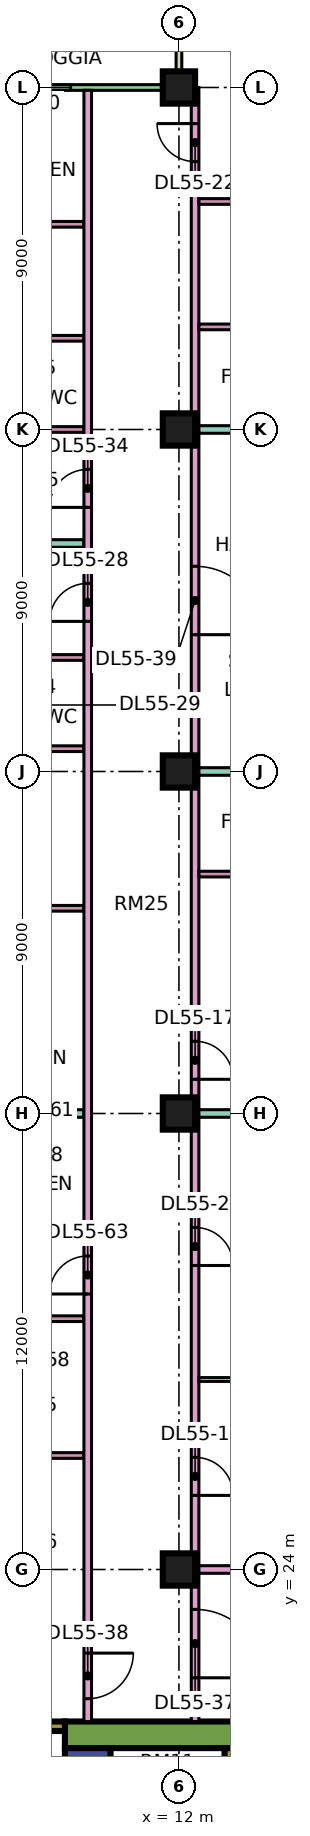
"""IFC4 building model, lengths in metres.
Left out: names, types, materials, properties, quantities, classifications, styles, units other than length and angle.
Written with IfcOpenShell. Run it as: python <this file> out.ifc"""

import sys

from ifc_helpers import new_model, si_unit, direction, frame, frame_2d, origin, origin_2d, place, context, subcontext, project, spatial, rectangle, extrude, element, fill, save


model = new_model("IFC4")
c1 = context("Model", 3, precision=1e-05, world=origin(), true_north=direction((0.0, 1.0)))
c2 = subcontext(c1, "Body", "Model", "MODEL_VIEW")
j1 = project(units=[si_unit("LENGTHUNIT", "METRE"), si_unit("PLANEANGLEUNIT", "RADIAN")], contexts=[c1])
p1 = place(None, origin())
s1 = spatial("IfcSite", under=j1, at=p1, CompositionType="ELEMENT")
p2 = place(p1, origin())
s2 = spatial("IfcBuilding", under=s1, at=p2, CompositionType="ELEMENT")
p3 = place(p2, frame((0.0, 0.0, 234.15)))
s3 = spatial("IfcBuildingStorey", under=s2, at=p3, CompositionType="ELEMENT", Elevation=234.15)
for number, where, z_axis, x_axis in (
    (1, (12.0, 24.0, 0.0), (0.0, 0.0, 1.0), (1.0, 0.0, 0.0)),
    (2, (12.0, 36.0, 0.0), (0.0, 0.0, 1.0), (1.0, 0.0, 0.0)),
    (3, (12.0, 45.0, 0.0), (0.0, 0.0, 1.0), (1.0, 0.0, 0.0)),
    (4, (12.0, 54.0, 0.0), (0.0, 0.0, 1.0), (1.0, 0.0, 0.0)),
    (5, (12.0, 63.0, 0.0), (0.0, 0.0, 1.0), (1.0, 0.0, 0.0)),
):
    element("IfcColumn", number, at=place(p3, frame(where, z_axis=z_axis, x_axis=x_axis)), inside=s3, PredefinedType="COLUMN", context=c2, shape_type="SweptSolid", body=[
        extrude(rectangle(XDim=0.85, YDim=0.85, at=origin_2d()), origin(), (0.0, 0.0, 1.0), 3.75),
    ])
p4 = place(p3, frame((9.0, 19.65, 0.0), z_axis=(0.0, 0.0, 1.0), x_axis=(1.0, 0.0, 0.0)))
e6 = element("IfcWall", 6, at=p4, inside=s3, PredefinedType="SHEAR", context=c2, shape_type="SweptSolid", body=[
    extrude(rectangle(XDim=25.0, YDim=0.7, at=frame_2d((12.5, 0.0))), origin(), (0.0, 0.0, 1.0), 3.75),
])
p5 = place(p4, frame((19.1, 0.0, 0.0)))
e7 = element("IfcOpeningElement", 7, at=p5, cuts=e6, PredefinedType="OPENING", context=c2, shape_type="SweptSolid", body=[
    extrude(rectangle(XDim=1.8, YDim=2.4, at=frame_2d((0.9, 1.2))), frame((0.0, 0.36, 0.0), z_axis=(0.0, -1.0, 0.0), x_axis=(1.0, 0.0, 0.0)), (0.0, 0.0, 1.0), 0.72),
])
p6 = place(p3, frame((9.6, 7.7, 0.0), z_axis=(0.0, 0.0, 1.0), x_axis=(0.0, 1.0, 0.0)))
e8 = element("IfcWall", 8, at=p6, inside=s3, PredefinedType="SHEAR", context=c2, shape_type="SweptSolid", body=[
    extrude(rectangle(XDim=11.6, YDim=1.2, at=frame_2d((5.8, 0.0))), origin(), (0.0, 0.0, 1.0), 3.75),
])
p7 = place(p6, frame((4.175, 0.0, 0.0)))
e9 = element("IfcOpeningElement", 9, at=p7, cuts=e8, PredefinedType="OPENING", context=c2, shape_type="SweptSolid", body=[
    extrude(rectangle(XDim=1.1, YDim=2.2, at=frame_2d((0.55, 1.1))), frame((0.0, 0.61, 0.0), z_axis=(0.0, -1.0, 0.0), x_axis=(1.0, 0.0, 0.0)), (0.0, 0.0, 1.0), 1.22),
])
p8 = place(p6, frame((6.675, 0.0, 0.0)))
e10 = element("IfcOpeningElement", 10, at=p8, cuts=e8, PredefinedType="OPENING", context=c2, shape_type="SweptSolid", body=[
    extrude(rectangle(XDim=1.1, YDim=2.2, at=frame_2d((0.55, 1.1))), frame((0.0, 0.61, 0.0), z_axis=(0.0, -1.0, 0.0), x_axis=(1.0, 0.0, 0.0)), (0.0, 0.0, 1.0), 1.22),
])
p9 = place(p6, frame((9.55, 0.0, 0.0)))
e11 = element("IfcOpeningElement", 11, at=p9, cuts=e8, PredefinedType="OPENING", context=c2, shape_type="SweptSolid", body=[
    extrude(rectangle(XDim=1.1, YDim=2.2, at=frame_2d((0.55, 1.1))), frame((0.0, 0.61, 0.0), z_axis=(0.0, -1.0, 0.0), x_axis=(1.0, 0.0, 0.0)), (0.0, 0.0, 1.0), 1.22),
])
p10 = place(p6, frame((1.85, 0.0, 0.0)))
e12 = element("IfcOpeningElement", 12, at=p10, cuts=e8, PredefinedType="OPENING", context=c2, shape_type="SweptSolid", body=[
    extrude(rectangle(XDim=0.9, YDim=2.1, at=frame_2d((0.45, 1.05))), frame((0.0, 0.61, 0.0), z_axis=(0.0, -1.0, 0.0), x_axis=(1.0, 0.0, 0.0)), (0.0, 0.0, 1.0), 1.22),
])
p11 = place(p3, frame((13.325, 7.7, 0.0), z_axis=(0.0, 0.0, 1.0), x_axis=(0.0, 1.0, 0.0)))
e13 = element("IfcWall", 13, at=p11, inside=s3, PredefinedType="SHEAR", context=c2, shape_type="SweptSolid", body=[
    extrude(rectangle(XDim=11.6, YDim=0.25, at=frame_2d((5.8, 0.0))), origin(), (0.0, 0.0, 1.0), 3.75),
])
p12 = place(p3, frame((2.1, 19.875, 0.0), z_axis=(0.0, 0.0, 1.0), x_axis=(1.0, 0.0, 0.0)))
e14 = element("IfcWall", 14, at=p12, inside=s3, PredefinedType="SHEAR", context=c2, shape_type="SweptSolid", body=[
    extrude(rectangle(XDim=6.9, YDim=0.25, at=frame_2d((3.45, 0.0))), origin(), (0.0, 0.0, 1.0), 3.75),
])
p13 = place(p12, frame((1.175, 0.0, 0.0)))
e15 = element("IfcOpeningElement", 15, at=p13, cuts=e14, PredefinedType="OPENING", context=c2, shape_type="SweptSolid", body=[
    extrude(rectangle(XDim=1.1, YDim=2.2, at=frame_2d((0.55, 1.1))), frame((0.0, 0.135, 0.0), z_axis=(0.0, -1.0, 0.0), x_axis=(1.0, 0.0, 0.0)), (0.0, 0.0, 1.0), 0.27),
])
p14 = place(p12, frame((4.6, 0.0, 0.0)))
e16 = element("IfcOpeningElement", 16, at=p14, cuts=e14, PredefinedType="OPENING", context=c2, shape_type="SweptSolid", body=[
    extrude(rectangle(XDim=1.2, YDim=2.2, at=frame_2d((0.6, 1.1))), frame((0.0, 0.135, 0.0), z_axis=(0.0, -1.0, 0.0), x_axis=(1.0, 0.0, 0.0)), (0.0, 0.0, 1.0), 0.27),
])
p15 = place(p3, frame((11.925, 63.0, 0.0), z_axis=(0.0, 0.0, 1.0), x_axis=(-1.0, 0.0, 0.0)))
e17 = element("IfcWall", 17, at=p15, inside=s3, PredefinedType="SOLIDWALL", context=c2, shape_type="SweptSolid", body=[
    extrude(rectangle(XDim=10.35, YDim=0.15, at=frame_2d((5.175, 0.0))), origin(), (0.0, 0.0, 1.0), 3.35),
])
p16 = place(p15, frame((2.775, 0.0, 0.45)))
e18 = element("IfcOpeningElement", 18, at=p16, cuts=e17, PredefinedType="OPENING", context=c2, shape_type="SweptSolid", body=[
    extrude(rectangle(XDim=2.4, YDim=2.4, at=frame_2d((1.2, 1.2))), frame((0.0, 0.085, 0.0), z_axis=(0.0, -1.0, 0.0), x_axis=(1.0, 0.0, 0.0)), (0.0, 0.0, 1.0), 0.17),
])
p17 = place(p15, frame((7.087, 0.0, 0.0)))
e19 = element("IfcOpeningElement", 19, at=p17, cuts=e17, PredefinedType="OPENING", context=c2, shape_type="SweptSolid", body=[
    extrude(rectangle(XDim=1.8, YDim=2.4, at=frame_2d((0.9, 1.2))), frame((0.0, 0.085, 0.0), z_axis=(0.0, -1.0, 0.0), x_axis=(1.0, 0.0, 0.0)), (0.0, 0.0, 1.0), 0.17),
])
p18 = place(p3, frame((12.0, 64.5, 0.0), z_axis=(0.0, 0.0, 1.0), x_axis=(0.0, -1.0, 0.0)))
e20 = element("IfcWall", 20, at=p18, inside=s3, PredefinedType="SOLIDWALL", context=c2, shape_type="SweptSolid", body=[
    extrude(rectangle(XDim=1.5, YDim=0.15, at=frame_2d((0.75, 0.0))), origin(), (0.0, 0.0, 1.0), 3.35),
])
p19 = place(p3, frame((-1.35, 22.4, 0.0), z_axis=(0.0, 0.0, 1.0), x_axis=(1.0, 0.0, 0.0)))
e21 = element("IfcWall", 21, at=p19, inside=s3, PredefinedType="PARTITIONING", context=c2, shape_type="SweptSolid", body=[
    extrude(rectangle(XDim=10.85, YDim=0.2, at=frame_2d((5.425, 0.0))), origin(), (0.0, 0.0, 1.0), 3.35),
])
p20 = place(p3, frame((0.074, 51.0, 0.0), z_axis=(0.0, 0.0, 1.0), x_axis=(1.0, 0.0, 0.0)))
e22 = element("IfcWall", 22, at=p20, inside=s3, PredefinedType="PARTITIONING", context=c2, shape_type="SweptSolid", body=[
    extrude(rectangle(XDim=9.426, YDim=0.2, at=frame_2d((4.713, 0.0))), origin(), (0.0, 0.0, 1.0), 3.35),
])
for number, where, z_axis, x_axis in (
    (23, (6.375, 41.4, 0.0), (0.0, 0.0, 1.0), (1.0, 0.0, 0.0)),
    (24, (6.375, 45.6, 0.0), (0.0, 0.0, 1.0), (1.0, 0.0, 0.0)),
    (25, (6.375, 48.0, 0.0), (0.0, 0.0, 1.0), (1.0, 0.0, 0.0)),
    (26, (6.375, 54.0, 0.0), (0.0, 0.0, 1.0), (1.0, 0.0, 0.0)),
    (27, (6.375, 56.4, 0.0), (0.0, 0.0, 1.0), (1.0, 0.0, 0.0)),
    (28, (6.375, 59.4, 0.0), (0.0, 0.0, 1.0), (1.0, 0.0, 0.0)),
):
    element("IfcWall", number, at=place(p3, frame(where, z_axis=z_axis, x_axis=x_axis)), inside=s3, PredefinedType="PARTITIONING", context=c2, shape_type="SweptSolid", body=[
        extrude(rectangle(XDim=3.125, YDim=0.15, at=frame_2d((1.562, 0.0))), origin(), (0.0, 0.0, 1.0), 3.35),
    ])
p21 = place(p3, frame((6.55, 36.0, 0.0), z_axis=(0.0, 0.0, 1.0), x_axis=(1.0, 0.0, 0.0)))
e29 = element("IfcWall", 29, at=p21, inside=s3, PredefinedType="PARTITIONING", context=c2, shape_type="SweptSolid", body=[
    extrude(rectangle(XDim=2.95, YDim=0.2, at=frame_2d((1.475, 0.0))), origin(), (0.0, 0.0, 1.0), 3.35),
])
p22 = place(p3, frame((6.65, 33.0, 0.0), z_axis=(0.0, 0.0, 1.0), x_axis=(1.0, 0.0, 0.0)))
e30 = element("IfcWall", 30, at=p22, inside=s3, PredefinedType="PARTITIONING", context=c2, shape_type="SweptSolid", body=[
    extrude(rectangle(XDim=2.85, YDim=0.1, at=frame_2d((1.425, 0.0))), origin(), (0.0, 0.0, 1.0), 3.35),
])
p23 = place(p3, frame((6.675, 27.0, 0.0), z_axis=(0.0, 0.0, 1.0), x_axis=(1.0, 0.0, 0.0)))
e31 = element("IfcWall", 31, at=p23, inside=s3, PredefinedType="PARTITIONING", context=c2, shape_type="SweptSolid", body=[
    extrude(rectangle(XDim=2.825, YDim=0.15, at=frame_2d((1.413, 0.0))), origin(), (0.0, 0.0, 1.0), 3.35),
])
p24 = place(p3, frame((6.675, 30.6, 0.0), z_axis=(0.0, 0.0, 1.0), x_axis=(1.0, 0.0, 0.0)))
e32 = element("IfcWall", 32, at=p24, inside=s3, PredefinedType="PARTITIONING", context=c2, shape_type="SweptSolid", body=[
    extrude(rectangle(XDim=2.825, YDim=0.15, at=frame_2d((1.413, 0.0))), origin(), (0.0, 0.0, 1.0), 3.35),
])
p25 = place(p24, frame((0.975, 0.0, 0.0)))
e33 = element("IfcOpeningElement", 33, at=p25, cuts=e32, PredefinedType="OPENING", context=c2, shape_type="SweptSolid", body=[
    extrude(rectangle(XDim=0.8, YDim=2.1, at=frame_2d((0.4, 1.05))), frame((0.0, 0.085, 0.0), z_axis=(0.0, -1.0, 0.0), x_axis=(1.0, 0.0, 0.0)), (0.0, 0.0, 1.0), 0.17),
])
p26 = place(p3, frame((9.6, 20.0, 0.0), z_axis=(0.0, 0.0, 1.0), x_axis=(0.0, 1.0, 0.0)))
e34 = element("IfcWall", 34, at=p26, inside=s3, PredefinedType="PARTITIONING", context=c2, shape_type="SweptSolid", body=[
    extrude(rectangle(XDim=42.926, YDim=0.2, at=frame_2d((21.463, 0.0))), origin(), (0.0, 0.0, 1.0), 3.35),
])
p27 = place(p26, frame((28.95, 0.0, 0.0)))
e35 = element("IfcOpeningElement", 35, at=p27, cuts=e34, PredefinedType="OPENING", context=c2, shape_type="SweptSolid", body=[
    extrude(rectangle(XDim=1.0, YDim=2.1, at=frame_2d((0.5, 1.05))), frame((0.0, 0.11, 0.0), z_axis=(0.0, -1.0, 0.0), x_axis=(1.0, 0.0, 0.0)), (0.0, 0.0, 1.0), 0.22),
])
p28 = place(p26, frame((31.95, 0.0, 0.0)))
e36 = element("IfcOpeningElement", 36, at=p28, cuts=e34, PredefinedType="OPENING", context=c2, shape_type="SweptSolid", body=[
    extrude(rectangle(XDim=1.0, YDim=2.1, at=frame_2d((0.5, 1.05))), frame((0.0, 0.11, 0.0), z_axis=(0.0, -1.0, 0.0), x_axis=(1.0, 0.0, 0.0)), (0.0, 0.0, 1.0), 0.22),
])
p29 = place(p26, frame((0.6, 0.0, 0.0)))
e37 = element("IfcOpeningElement", 37, at=p29, cuts=e34, PredefinedType="OPENING", context=c2, shape_type="SweptSolid", body=[
    extrude(rectangle(XDim=1.2, YDim=2.1, at=frame_2d((0.6, 1.05))), frame((0.0, 0.11, 0.0), z_axis=(0.0, -1.0, 0.0), x_axis=(1.0, 0.0, 0.0)), (0.0, 0.0, 1.0), 0.22),
])
p30 = place(p26, frame((11.25, 0.0, 0.0)))
e38 = element("IfcOpeningElement", 38, at=p30, cuts=e34, PredefinedType="OPENING", context=c2, shape_type="SweptSolid", body=[
    extrude(rectangle(XDim=1.0, YDim=2.1, at=frame_2d((0.5, 1.05))), frame((0.0, 0.11, 0.0), z_axis=(0.0, -1.0, 0.0), x_axis=(1.0, 0.0, 0.0)), (0.0, 0.0, 1.0), 0.22),
])
p31 = place(p3, frame((12.425, 20.0, 0.0), z_axis=(0.0, 0.0, 1.0), x_axis=(0.0, 1.0, 0.0)))
e39 = element("IfcWall", 39, at=p31, inside=s3, PredefinedType="PARTITIONING", context=c2, shape_type="SweptSolid", body=[
    extrude(rectangle(XDim=43.0, YDim=0.2, at=frame_2d((21.5, 0.0))), origin(), (0.0, 0.0, 1.0), 3.35),
])
p32 = place(p31, frame((5.95, 0.0, 0.0)))
e40 = element("IfcOpeningElement", 40, at=p32, cuts=e39, PredefinedType="OPENING", context=c2, shape_type="SweptSolid", body=[
    extrude(rectangle(XDim=1.0, YDim=2.1, at=frame_2d((0.5, 1.05))), frame((0.0, 0.11, 0.0), z_axis=(0.0, -1.0, 0.0), x_axis=(1.0, 0.0, 0.0)), (0.0, 0.0, 1.0), 0.22),
])
p33 = place(p31, frame((12.0, 0.0, 0.0)))
e41 = element("IfcOpeningElement", 41, at=p33, cuts=e39, PredefinedType="OPENING", context=c2, shape_type="SweptSolid", body=[
    extrude(rectangle(XDim=1.0, YDim=2.1, at=frame_2d((0.5, 1.05))), frame((0.0, 0.11, 0.0), z_axis=(0.0, -1.0, 0.0), x_axis=(1.0, 0.0, 0.0)), (0.0, 0.0, 1.0), 0.22),
])
p34 = place(p31, frame((16.9, 0.0, 0.0)))
e42 = element("IfcOpeningElement", 42, at=p34, cuts=e39, PredefinedType="OPENING", context=c2, shape_type="SweptSolid", body=[
    extrude(rectangle(XDim=1.0, YDim=2.1, at=frame_2d((0.5, 1.05))), frame((0.0, 0.11, 0.0), z_axis=(0.0, -1.0, 0.0), x_axis=(1.0, 0.0, 0.0)), (0.0, 0.0, 1.0), 0.22),
])
p35 = place(p31, frame((41.05, 0.0, 0.0)))
e43 = element("IfcOpeningElement", 43, at=p35, cuts=e39, PredefinedType="OPENING", context=c2, shape_type="SweptSolid", body=[
    extrude(rectangle(XDim=1.0, YDim=2.1, at=frame_2d((0.5, 1.05))), frame((0.0, 0.11, 0.0), z_axis=(0.0, -1.0, 0.0), x_axis=(1.0, 0.0, 0.0)), (0.0, 0.0, 1.0), 0.22),
])
p36 = place(p31, frame((1.15, 0.0, 0.0)))
e44 = element("IfcOpeningElement", 44, at=p36, cuts=e39, PredefinedType="OPENING", context=c2, shape_type="SweptSolid", body=[
    extrude(rectangle(XDim=1.8, YDim=2.1, at=frame_2d((0.9, 1.05))), frame((0.0, 0.11, 0.0), z_axis=(0.0, -1.0, 0.0), x_axis=(1.0, 0.0, 0.0)), (0.0, 0.0, 1.0), 0.22),
])
p37 = place(p31, frame((28.6, 0.0, 0.0)))
e45 = element("IfcOpeningElement", 45, at=p37, cuts=e39, PredefinedType="OPENING", context=c2, shape_type="SweptSolid", body=[
    extrude(rectangle(XDim=1.8, YDim=2.1, at=frame_2d((0.9, 1.05))), frame((0.0, 0.11, 0.0), z_axis=(0.0, -1.0, 0.0), x_axis=(1.0, 0.0, 0.0)), (0.0, 0.0, 1.0), 0.22),
])
p38 = place(p3, frame((12.525, 24.0, 0.0), z_axis=(0.0, 0.0, 1.0), x_axis=(1.0, 0.0, 0.0)))
e46 = element("IfcWall", 46, at=p38, inside=s3, PredefinedType="PARTITIONING", context=c2, shape_type="SweptSolid", body=[
    extrude(rectangle(XDim=8.975, YDim=0.2, at=frame_2d((4.488, 0.0))), origin(), (0.0, 0.0, 1.0), 3.35),
])
p39 = place(p3, frame((12.525, 29.0, 0.0), z_axis=(0.0, 0.0, 1.0), x_axis=(1.0, 0.0, 0.0)))
e47 = element("IfcWall", 47, at=p39, inside=s3, PredefinedType="PARTITIONING", context=c2, shape_type="SweptSolid", body=[
    extrude(rectangle(XDim=8.975, YDim=0.1, at=frame_2d((4.488, 0.0))), origin(), (0.0, 0.0, 1.0), 3.35),
])
p40 = place(p3, frame((12.525, 36.0, 0.0), z_axis=(0.0, 0.0, 1.0), x_axis=(1.0, 0.0, 0.0)))
e48 = element("IfcWall", 48, at=p40, inside=s3, PredefinedType="PARTITIONING", context=c2, shape_type="SweptSolid", body=[
    extrude(rectangle(XDim=11.475, YDim=0.2, at=frame_2d((5.738, 0.0))), origin(), (0.0, 0.0, 1.0), 3.35),
])
for number, where, z_axis, x_axis in (
    (49, (12.525, 38.7, 0.0), (0.0, 0.0, 1.0), (1.0, 0.0, 0.0)),
    (50, (12.525, 42.3, 0.0), (0.0, 0.0, 1.0), (1.0, 0.0, 0.0)),
):
    element("IfcWall", number, at=place(p3, frame(where, z_axis=z_axis, x_axis=x_axis)), inside=s3, PredefinedType="PARTITIONING", context=c2, shape_type="SweptSolid", body=[
        extrude(rectangle(XDim=5.225, YDim=0.15, at=frame_2d((2.613, 0.0))), origin(), (0.0, 0.0, 1.0), 3.35),
    ])
p41 = place(p3, frame((12.525, 45.0, 0.0), z_axis=(0.0, 0.0, 1.0), x_axis=(1.0, 0.0, 0.0)))
e51 = element("IfcWall", 51, at=p41, inside=s3, PredefinedType="PARTITIONING", context=c2, shape_type="SweptSolid", body=[
    extrude(rectangle(XDim=11.475, YDim=0.2, at=frame_2d((5.738, 0.0))), origin(), (0.0, 0.0, 1.0), 3.35),
])
p42 = place(p3, frame((12.525, 54.0, 0.0), z_axis=(0.0, 0.0, 1.0), x_axis=(1.0, 0.0, 0.0)))
e52 = element("IfcWall", 52, at=p42, inside=s3, PredefinedType="PARTITIONING", context=c2, shape_type="SweptSolid", body=[
    extrude(rectangle(XDim=11.401, YDim=0.2, at=frame_2d((5.701, 0.0))), origin(), (0.0, 0.0, 1.0), 3.35),
])
for number, where, z_axis, x_axis in (
    (53, (12.525, 56.7, 0.0), (0.0, 0.0, 1.0), (1.0, 0.0, 0.0)),
    (54, (12.525, 60.0, 0.0), (0.0, 0.0, 1.0), (1.0, 0.0, 0.0)),
):
    element("IfcWall", number, at=place(p3, frame(where, z_axis=z_axis, x_axis=x_axis)), inside=s3, PredefinedType="PARTITIONING", context=c2, shape_type="SweptSolid", body=[
        extrude(rectangle(XDim=5.225, YDim=0.15, at=frame_2d((2.613, 0.0))), origin(), (0.0, 0.0, 1.0), 3.35),
    ])
p43 = place(p16, origin())
e55 = element("IfcWindow", 55, at=p43, inside=s3, PartitioningType="SINGLE_PANEL", PredefinedType="WINDOW", context=c2, shape_type="SweptSolid", body=[
    extrude(rectangle(XDim=2.4, YDim=2.4, at=frame_2d((1.2, 1.2))), frame((0.0, 0.03, 0.0), z_axis=(0.0, -1.0, 0.0), x_axis=(1.0, 0.0, 0.0)), (0.0, 0.0, 1.0), 0.06),
])
fill(e18, e55)
p44 = place(p32, frame((1.0, 0.0, 0.0), z_axis=(0.0, 0.0, 1.0), x_axis=(-1.0, 0.0, 0.0)))
e56 = element("IfcDoor", 56, at=p44, inside=s3, OperationType="SINGLE_SWING_LEFT", PredefinedType="DOOR", context=c2, shape_type="SweptSolid", body=[
    extrude(rectangle(XDim=1.0, YDim=2.1, at=frame_2d((0.5, 1.05))), frame((0.0, 0.025, 0.0), z_axis=(0.0, -1.0, 0.0), x_axis=(1.0, 0.0, 0.0)), (0.0, 0.0, 1.0), 0.05),
])
fill(e40, e56)
p45 = place(p33, frame((1.0, 0.0, 0.0), z_axis=(0.0, 0.0, 1.0), x_axis=(-1.0, 0.0, 0.0)))
e57 = element("IfcDoor", 57, at=p45, inside=s3, OperationType="SINGLE_SWING_LEFT", PredefinedType="DOOR", context=c2, shape_type="SweptSolid", body=[
    extrude(rectangle(XDim=1.0, YDim=2.1, at=frame_2d((0.5, 1.05))), frame((0.0, 0.025, 0.0), z_axis=(0.0, -1.0, 0.0), x_axis=(1.0, 0.0, 0.0)), (0.0, 0.0, 1.0), 0.05),
])
fill(e41, e57)
p46 = place(p34, frame((1.0, 0.0, 0.0), z_axis=(0.0, 0.0, 1.0), x_axis=(-1.0, 0.0, 0.0)))
e58 = element("IfcDoor", 58, at=p46, inside=s3, OperationType="SINGLE_SWING_LEFT", PredefinedType="DOOR", context=c2, shape_type="SweptSolid", body=[
    extrude(rectangle(XDim=1.0, YDim=2.1, at=frame_2d((0.5, 1.05))), frame((0.0, 0.025, 0.0), z_axis=(0.0, -1.0, 0.0), x_axis=(1.0, 0.0, 0.0)), (0.0, 0.0, 1.0), 0.05),
])
fill(e42, e58)
p47 = place(p35, frame((1.0, 0.0, 0.0), z_axis=(0.0, 0.0, 1.0), x_axis=(-1.0, 0.0, 0.0)))
e59 = element("IfcDoor", 59, at=p47, inside=s3, OperationType="SINGLE_SWING_RIGHT", PredefinedType="DOOR", context=c2, shape_type="SweptSolid", body=[
    extrude(rectangle(XDim=1.0, YDim=2.1, at=frame_2d((0.5, 1.05))), frame((0.0, 0.025, 0.0), z_axis=(0.0, -1.0, 0.0), x_axis=(1.0, 0.0, 0.0)), (0.0, 0.0, 1.0), 0.05),
])
fill(e43, e59)
p48 = place(p27, origin())
e60 = element("IfcDoor", 60, at=p48, inside=s3, OperationType="SINGLE_SWING_LEFT", PredefinedType="DOOR", context=c2, shape_type="SweptSolid", body=[
    extrude(rectangle(XDim=1.0, YDim=2.1, at=frame_2d((0.5, 1.05))), frame((0.0, 0.025, 0.0), z_axis=(0.0, -1.0, 0.0), x_axis=(1.0, 0.0, 0.0)), (0.0, 0.0, 1.0), 0.05),
])
fill(e35, e60)
p49 = place(p28, origin())
e61 = element("IfcDoor", 61, at=p49, inside=s3, OperationType="SINGLE_SWING_LEFT", PredefinedType="DOOR", context=c2, shape_type="SweptSolid", body=[
    extrude(rectangle(XDim=1.0, YDim=2.1, at=frame_2d((0.5, 1.05))), frame((0.0, 0.025, 0.0), z_axis=(0.0, -1.0, 0.0), x_axis=(1.0, 0.0, 0.0)), (0.0, 0.0, 1.0), 0.05),
])
fill(e36, e61)
p50 = place(p36, frame((1.8, 0.0, 0.0), z_axis=(0.0, 0.0, 1.0), x_axis=(-1.0, 0.0, 0.0)))
e62 = element("IfcDoor", 62, at=p50, inside=s3, OperationType="DOUBLE_DOOR_SINGLE_SWING", PredefinedType="DOOR", context=c2, shape_type="SweptSolid", body=[
    extrude(rectangle(XDim=1.8, YDim=2.1, at=frame_2d((0.9, 1.05))), frame((0.0, 0.025, 0.0), z_axis=(0.0, -1.0, 0.0), x_axis=(1.0, 0.0, 0.0)), (0.0, 0.0, 1.0), 0.05),
])
fill(e44, e62)
p51 = place(p29, origin())
e63 = element("IfcDoor", 63, at=p51, inside=s3, OperationType="SINGLE_SWING_RIGHT", PredefinedType="DOOR", context=c2, shape_type="SweptSolid", body=[
    extrude(rectangle(XDim=1.2, YDim=2.1, at=frame_2d((0.6, 1.05))), frame((0.0, 0.025, 0.0), z_axis=(0.0, -1.0, 0.0), x_axis=(1.0, 0.0, 0.0)), (0.0, 0.0, 1.0), 0.05),
])
fill(e37, e63)
p52 = place(p37, frame((1.8, 0.0, 0.0), z_axis=(0.0, 0.0, 1.0), x_axis=(-1.0, 0.0, 0.0)))
e64 = element("IfcDoor", 64, at=p52, inside=s3, OperationType="DOUBLE_DOOR_SINGLE_SWING", PredefinedType="DOOR", context=c2, shape_type="SweptSolid", body=[
    extrude(rectangle(XDim=1.8, YDim=2.1, at=frame_2d((0.9, 1.05))), frame((0.0, 0.025, 0.0), z_axis=(0.0, -1.0, 0.0), x_axis=(1.0, 0.0, 0.0)), (0.0, 0.0, 1.0), 0.05),
])
fill(e45, e64)
p53 = place(p30, origin())
e65 = element("IfcDoor", 65, at=p53, inside=s3, OperationType="SINGLE_SWING_LEFT", PredefinedType="DOOR", context=c2, shape_type="SweptSolid", body=[
    extrude(rectangle(XDim=1.0, YDim=2.1, at=frame_2d((0.5, 1.05))), frame((0.0, 0.025, 0.0), z_axis=(0.0, -1.0, 0.0), x_axis=(1.0, 0.0, 0.0)), (0.0, 0.0, 1.0), 0.05),
])
fill(e38, e65)
save(model, sys.argv[1])
